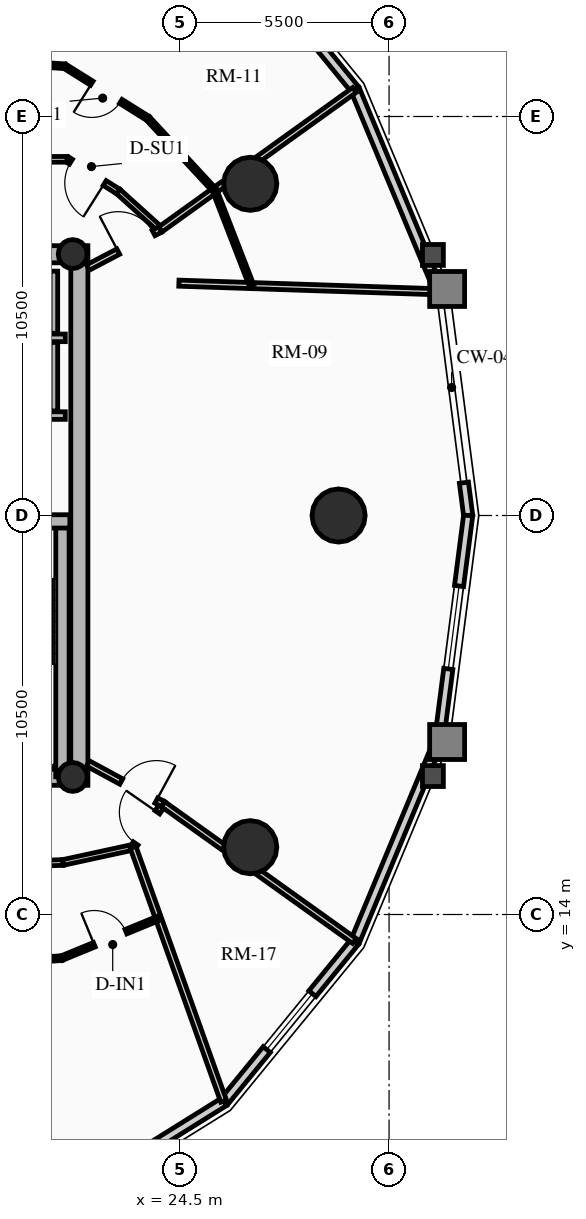
"""IFC4 building model, lengths in metres.
Left out: names, types, materials, properties, quantities, classifications, styles, units other than length and angle.
Written with IfcOpenShell. Run it as: python <this file> out.ifc"""

import sys

from ifc_helpers import new_model, si_unit, direction, frame, frame_2d, origin, origin_2d, place, context, subcontext, project, spatial, rectangle, circle, hollow_circle, extrude, source, transform, mapped, element, fill, save


model = new_model("IFC4")
c1 = context("Model", 3, precision=1e-05, world=origin(), true_north=direction((0.0, 1.0)))
c2 = subcontext(c1, "Body", "Model", "MODEL_VIEW")
j1 = project(units=[si_unit("LENGTHUNIT", "METRE"), si_unit("PLANEANGLEUNIT", "RADIAN")], contexts=[c1])
p1 = place(None, origin())
s1 = spatial("IfcSite", under=j1, at=p1, CompositionType="ELEMENT")
p2 = place(p1, origin())
s2 = spatial("IfcBuilding", under=s1, at=p2, CompositionType="ELEMENT")
p3 = place(p2, frame((0.0, 0.0, 110.89)))
s3 = spatial("IfcBuildingStorey", under=s2, at=p3, CompositionType="ELEMENT", Elevation=110.89)
p4 = place(p3, frame((21.85, 17.4, 0.0), z_axis=(0.0, 0.0, 1.0), x_axis=(0.0, 1.0, 0.0)))
e1 = element("IfcWall", 1, at=p4, inside=s3, PredefinedType="SHEAR", context=c2, shape_type="SweptSolid", body=[
    extrude(rectangle(XDim=14.2, YDim=0.45, at=frame_2d((7.1, 0.0))), origin(), (0.0, 0.0, 1.0), 2.91),
])
p5 = place(p3, frame((11.15, 17.625, 0.0), z_axis=(0.0, 0.0, 1.0), x_axis=(1.0, 0.0, 0.0)))
e2 = element("IfcWall", 2, at=p5, inside=s3, PredefinedType="SHEAR", context=c2, shape_type="SweptSolid", body=[
    extrude(rectangle(XDim=10.7, YDim=0.45, at=frame_2d((5.35, 0.0))), origin(), (0.0, 0.0, 1.0), 2.91),
])
m1 = source(origin(), c2, "Body", "SweptSolid", [
    extrude(rectangle(XDim=1.5, YDim=2.02, at=frame_2d((0.75, 1.01))), frame((0.0, 0.235, 0.0), z_axis=(0.0, -1.0, 0.0), x_axis=(1.0, 0.0, 0.0)), (0.0, 0.0, 1.0), 0.47),
])
p6 = place(p5, frame((5.45, 0.0, 0.0)))
e3 = element("IfcOpeningElement", 3, at=p6, cuts=e2, PredefinedType="OPENING", context=c2, shape_type="MappedRepresentation", body=[
    mapped(m1, transform((0.0, 0.0, 0.0), x_axis=(1.0, 0.0, 0.0), y_axis=(0.0, 1.0, 0.0), z_axis=(0.0, 0.0, 1.0), scale=1.0)),
])
p7 = place(p3, frame((11.15, 31.375, 0.0), z_axis=(0.0, 0.0, 1.0), x_axis=(1.0, 0.0, 0.0)))
e4 = element("IfcWall", 4, at=p7, inside=s3, PredefinedType="SHEAR", context=c2, shape_type="SweptSolid", body=[
    extrude(rectangle(XDim=10.7, YDim=0.45, at=frame_2d((5.35, 0.0))), origin(), (0.0, 0.0, 1.0), 2.91),
])
p8 = place(p7, frame((4.6, 0.0, 0.0)))
e5 = element("IfcOpeningElement", 5, at=p8, cuts=e4, PredefinedType="OPENING", context=c2, shape_type="MappedRepresentation", body=[
    mapped(m1, transform((0.0, 0.0, 0.0), x_axis=(1.0, 0.0, 0.0), y_axis=(0.0, 1.0, 0.0), z_axis=(0.0, 0.0, 1.0), scale=1.0)),
])
p9 = place(p3, frame((21.405, 17.625, 0.0), z_axis=(0.0, 0.0, 1.0), x_axis=(0.0, 1.0, 0.0)))
e6 = element("IfcWall", 6, at=p9, inside=s3, PredefinedType="SHEAR", context=c2, shape_type="SweptSolid", body=[
    extrude(rectangle(XDim=6.72, YDim=0.35, at=frame_2d((3.36, 0.0))), origin(), (0.0, 0.0, 1.0), 2.91),
])
p10 = place(p3, frame((18.315, 24.345, 0.0), z_axis=(0.0, 0.0, 1.0), x_axis=(1.0, 0.0, 0.0)))
e7 = element("IfcWall", 7, at=p10, inside=s3, PredefinedType="SHEAR", context=c2, shape_type="SweptSolid", body=[
    extrude(rectangle(XDim=3.285, YDim=0.35, at=frame_2d((1.643, 0.0))), origin(), (0.0, 0.0, 1.0), 2.91),
])
for number, where, z_axis, x_axis in (
    (8, (21.675, 17.62, 0.0), (0.0, 0.0, 1.0), (1.0, 0.0, 0.0)),
    (9, (21.675, 31.38, 0.0), (0.0, 0.0, 1.0), (1.0, 0.0, 0.0)),
):
    element("IfcColumn", number, at=place(p3, frame(where, z_axis=z_axis, x_axis=x_axis)), inside=s3, PredefinedType="COLUMN", context=c2, shape_type="SweptSolid", body=[
        extrude(hollow_circle(Radius=0.38, WallThickness=0.032, at=origin_2d()), origin(), (0.0, 0.0, 1.0), 2.91),
    ])
for number, where, z_axis, x_axis in (
    (10, (28.672, 24.5, 0.0), (0.0, 0.0, 1.0), (1.0, 0.0, 0.0)),
    (11, (26.347, 33.229, 0.0), (0.0, 0.0, 1.0), (1.0, 0.0, 0.0)),
    (12, (26.347, 15.771, 0.0), (0.0, 0.0, 1.0), (1.0, 0.0, 0.0)),
):
    element("IfcColumn", number, at=place(p3, frame(where, z_axis=z_axis, x_axis=x_axis)), inside=s3, PredefinedType="USERDEFINED", context=c2, shape_type="SweptSolid", body=[
        extrude(circle(Radius=0.7, at=origin_2d()), origin(), (0.0, 0.0, 1.0), 2.91),
    ])
p11 = place(p3, frame((31.969, 25.363, 0.0), z_axis=(0.0, 0.0, 1.0), x_axis=(0.128523364007, -0.991706481225, 0.0)))
e13 = element("IfcWall", 13, at=p11, inside=s3, PredefinedType="SOLIDWALL", context=c2, shape_type="SweptSolid", body=[
    extrude(rectangle(XDim=0.87, YDim=0.24, at=frame_2d((0.435, 0.0))), origin(), (0.0, 0.0, 1.0), 2.655),
])
p12 = place(p3, frame((29.105, 35.709, 0.0), z_axis=(0.0, 0.0, 1.0), x_axis=(0.384344417632, -0.923189779317, 0.0)))
e14 = element("IfcWall", 14, at=p12, inside=s3, PredefinedType="SOLIDWALL", context=c2, shape_type="SweptSolid", body=[
    extrude(rectangle(XDim=5.758, YDim=0.24, at=frame_2d((2.879, 0.0))), origin(), (0.0, 0.0, 1.0), 2.179),
])
p13 = place(p3, frame((25.658, 39.928, 0.0), z_axis=(0.0, 0.0, 1.0), x_axis=(0.632700781152, -0.77439635945, 0.0)))
e15 = element("IfcWall", 15, at=p13, inside=s3, PredefinedType="SOLIDWALL", context=c2, shape_type="SweptSolid", body=[
    extrude(rectangle(XDim=5.448, YDim=0.24, at=frame_2d((2.724, 0.0))), origin(), (0.0, 0.0, 1.0), 2.179),
])
m2 = source(origin(), c2, "Body", "SweptSolid", [
    extrude(rectangle(XDim=1.9, YDim=1.35, at=frame_2d((0.95, 0.675))), frame((0.0, 0.13, 0.0), z_axis=(0.0, -1.0, 0.0), x_axis=(1.0, 0.0, 0.0)), (0.0, 0.0, 1.0), 0.26),
])
p14 = place(p13, frame((1.774, 0.0, 0.65)))
e16 = element("IfcOpeningElement", 16, at=p14, cuts=e15, PredefinedType="OPENING", context=c2, shape_type="MappedRepresentation", body=[
    mapped(m2, transform((0.0, 0.0, 0.0), x_axis=(1.0, 0.0, 0.0), y_axis=(0.0, 1.0, 0.0), z_axis=(0.0, 0.0, 1.0), scale=1.0)),
])
p15 = place(p3, frame((25.658, 9.072, 0.0), z_axis=(0.0, 0.0, 1.0), x_axis=(-0.848520380187, -0.529162701263, 0.0)))
e17 = element("IfcWall", 17, at=p15, inside=s3, PredefinedType="SOLIDWALL", context=c2, shape_type="SweptSolid", body=[
    extrude(rectangle(XDim=5.119, YDim=0.24, at=frame_2d((2.56, 0.0))), origin(), (0.0, 0.0, 1.0), 2.179),
])
p16 = place(p3, frame((29.105, 13.291, 0.0), z_axis=(0.0, 0.0, 1.0), x_axis=(-0.632700781152, -0.77439635945, 0.0)))
e18 = element("IfcWall", 18, at=p16, inside=s3, PredefinedType="SOLIDWALL", context=c2, shape_type="SweptSolid", body=[
    extrude(rectangle(XDim=5.448, YDim=0.24, at=frame_2d((2.724, 0.0))), origin(), (0.0, 0.0, 1.0), 2.179),
])
p17 = place(p16, frame((1.774, 0.0, 0.65)))
e19 = element("IfcOpeningElement", 19, at=p17, cuts=e18, PredefinedType="OPENING", context=c2, shape_type="MappedRepresentation", body=[
    mapped(m2, transform((0.0, 0.0, 0.0), x_axis=(1.0, 0.0, 0.0), y_axis=(0.0, 1.0, 0.0), z_axis=(0.0, 0.0, 1.0), scale=1.0)),
])
p18 = place(p3, frame((31.318, 18.607, 0.0), z_axis=(0.0, 0.0, 1.0), x_axis=(-0.384344417632, -0.923189779317, 0.0)))
e20 = element("IfcWall", 20, at=p18, inside=s3, PredefinedType="SOLIDWALL", context=c2, shape_type="SweptSolid", body=[
    extrude(rectangle(XDim=5.758, YDim=0.24, at=frame_2d((2.879, 0.0))), origin(), (0.0, 0.0, 1.0), 2.179),
])
p19 = place(p3, frame((32.081, 24.5, 0.0), z_axis=(0.0, 0.0, 1.0), x_axis=(-0.128351991996, -0.991728675672, 0.0)))
e21 = element("IfcWall", 21, at=p19, inside=s3, PredefinedType="SOLIDWALL", context=c2, shape_type="SweptSolid", body=[
    extrude(rectangle(XDim=5.942, YDim=0.24, at=frame_2d((2.971, 0.0))), origin(), (0.0, 0.0, 1.0), 2.179),
])
m3 = source(origin(), c2, "Body", "SweptSolid", [
    extrude(rectangle(XDim=2.2, YDim=1.35, at=frame_2d((1.1, 0.675))), frame((0.0, 0.13, 0.0), z_axis=(0.0, -1.0, 0.0), x_axis=(1.0, 0.0, 0.0)), (0.0, 0.0, 1.0), 0.26),
])
p20 = place(p19, frame((1.871, 0.0, 0.65)))
e22 = element("IfcOpeningElement", 22, at=p20, cuts=e21, PredefinedType="OPENING", context=c2, shape_type="MappedRepresentation", body=[
    mapped(m3, transform((0.0, 0.0, 0.0), x_axis=(1.0, 0.0, 0.0), y_axis=(0.0, 1.0, 0.0), z_axis=(0.0, 0.0, 1.0), scale=1.0)),
])
for number, where, z_axis, x_axis in (
    (23, (18.51, 27.13, 0.0), (0.0, 0.0, 1.0), (1.0, 0.0, 0.0)),
    (24, (18.51, 29.175, 0.0), (0.0, 0.0, 1.0), (1.0, 0.0, 0.0)),
):
    element("IfcWall", number, at=place(p3, frame(where, z_axis=z_axis, x_axis=x_axis)), inside=s3, PredefinedType="SHEAR", context=c2, shape_type="SweptSolid", body=[
        extrude(rectangle(XDim=2.97, YDim=0.2, at=frame_2d((1.485, 0.0))), origin(), (0.0, 0.0, 1.0), 2.91),
    ])
p21 = place(p3, frame((21.18, 27.25, 0.0), z_axis=(0.0, 0.0, 1.0), x_axis=(0.0, 1.0, 0.0)))
e25 = element("IfcWall", 25, at=p21, inside=s3, PredefinedType="SHEAR", context=c2, shape_type="SweptSolid", body=[
    extrude(rectangle(XDim=1.805, YDim=0.2, at=frame_2d((0.902, 0.0))), origin(), (0.0, 0.0, 1.0), 2.91),
])
p22 = place(p3, frame((21.18, 29.295, 0.0), z_axis=(0.0, 0.0, 1.0), x_axis=(0.0, 1.0, 0.0)))
e26 = element("IfcWall", 26, at=p22, inside=s3, PredefinedType="SHEAR", context=c2, shape_type="SweptSolid", body=[
    extrude(rectangle(XDim=1.635, YDim=0.2, at=frame_2d((0.817, 0.0))), origin(), (0.0, 0.0, 1.0), 2.91),
])
p23 = place(p3, frame((23.98, 32.027, 0.0), z_axis=(0.0, 0.0, 1.0), x_axis=(-0.742353224332, 0.670008724065, 0.0)))
e27 = element("IfcWall", 27, at=p23, inside=s3, PredefinedType="PARTITIONING", context=c2, shape_type="SweptSolid", body=[
    extrude(rectangle(XDim=1.485, YDim=0.15, at=frame_2d((0.742, 0.0))), origin(), (0.0, 0.0, 1.0), 2.225),
])
p24 = place(p3, frame((22.877, 33.022, 0.0), z_axis=(0.0, 0.0, 1.0), x_axis=(-0.845895608855, 0.533348496689, 0.0)))
e28 = element("IfcWall", 28, at=p24, inside=s3, PredefinedType="PARTITIONING", context=c2, shape_type="SweptSolid", body=[
    extrude(rectangle(XDim=1.597, YDim=0.15, at=frame_2d((0.798, 0.0))), origin(), (0.0, 0.0, 1.0), 2.225),
])
m4 = source(origin(), c2, "Body", "SweptSolid", [
    extrude(rectangle(XDim=1.05, YDim=2.015, at=frame_2d((0.525, 1.007))), frame((0.0, 0.085, 0.0), z_axis=(0.0, -1.0, 0.0), x_axis=(1.0, 0.0, 0.0)), (0.0, 0.0, 1.0), 0.17),
])
p25 = place(p24, frame((0.427, 0.0, 0.0)))
e29 = element("IfcOpeningElement", 29, at=p25, cuts=e28, PredefinedType="OPENING", context=c2, shape_type="MappedRepresentation", body=[
    mapped(m4, transform((0.0, 0.0, 0.0), x_axis=(1.0, 0.0, 0.0), y_axis=(0.0, 1.0, 0.0), z_axis=(0.0, 0.0, 1.0), scale=1.0)),
])
p26 = place(p3, frame((21.527, 33.873, 0.0), z_axis=(0.0, 0.0, 1.0), x_axis=(-0.999991838845, -0.004040079574, 0.0)))
e30 = element("IfcWall", 30, at=p26, inside=s3, PredefinedType="PARTITIONING", context=c2, shape_type="SweptSolid", body=[
    extrude(rectangle(XDim=3.384, YDim=0.15, at=frame_2d((1.692, 0.0))), origin(), (0.0, 0.0, 1.0), 2.225),
])
p27 = place(p3, frame((14.781, 15.141, 0.0), z_axis=(0.0, 0.0, 1.0), x_axis=(0.999407918707, 0.034406569513, 0.0)))
e31 = element("IfcWall", 31, at=p27, inside=s3, PredefinedType="PARTITIONING", context=c2, shape_type="SweptSolid", body=[
    extrude(rectangle(XDim=6.642, YDim=0.15, at=frame_2d((3.321, 0.0))), origin(), (0.0, 0.0, 1.0), 2.225),
])
p28 = place(p27, frame((2.796, 0.0, 0.0)))
e32 = element("IfcOpeningElement", 32, at=p28, cuts=e31, PredefinedType="OPENING", context=c2, shape_type="MappedRepresentation", body=[
    mapped(m4, transform((0.0, 0.0, 0.0), x_axis=(1.0, 0.0, 0.0), y_axis=(0.0, 1.0, 0.0), z_axis=(0.0, 0.0, 1.0), scale=1.0)),
])
p29 = place(p3, frame((21.419, 15.369, 0.0), z_axis=(0.0, 0.0, 1.0), x_axis=(0.977192701953, 0.212354475464, 0.0)))
e33 = element("IfcWall", 33, at=p29, inside=s3, PredefinedType="PARTITIONING", context=c2, shape_type="SweptSolid", body=[
    extrude(rectangle(XDim=1.888, YDim=0.15, at=frame_2d((0.944, 0.0))), origin(), (0.0, 0.0, 1.0), 2.225),
])
p30 = place(p3, frame((23.263, 15.77, 0.0), z_axis=(0.0, 0.0, 1.0), x_axis=(0.570743456919, 0.821128434768, 0.0)))
e34 = element("IfcWall", 34, at=p30, inside=s3, PredefinedType="PARTITIONING", context=c2, shape_type="SweptSolid", body=[
    extrude(rectangle(XDim=1.382, YDim=0.15, at=frame_2d((0.691, 0.0))), origin(), (0.0, 0.0, 1.0), 2.225),
])
m5 = source(origin(), c2, "Body", "SweptSolid", [
    extrude(rectangle(XDim=1.0, YDim=2.015, at=frame_2d((0.5, 1.007))), frame((0.0, 0.085, 0.0), z_axis=(0.0, -1.0, 0.0), x_axis=(1.0, 0.0, 0.0)), (0.0, 0.0, 1.0), 0.17),
])
p31 = place(p30, frame((0.12, 0.0, 0.0)))
e35 = element("IfcOpeningElement", 35, at=p31, cuts=e34, PredefinedType="OPENING", context=c2, shape_type="MappedRepresentation", body=[
    mapped(m5, transform((0.0, 0.0, 0.0), x_axis=(1.0, 0.0, 0.0), y_axis=(0.0, 1.0, 0.0), z_axis=(0.0, 0.0, 1.0), scale=1.0)),
])
p32 = place(p3, frame((24.469, 30.614, 0.0), z_axis=(0.0, 0.0, 1.0), x_axis=(0.999446768925, -0.033258924898, 0.0)))
e36 = element("IfcWall", 36, at=p32, inside=s3, PredefinedType="PARTITIONING", context=c2, shape_type="SweptSolid", body=[
    extrude(rectangle(XDim=6.834, YDim=0.16, at=frame_2d((3.417, 0.0))), origin(), (0.0, 0.0, 1.0), 2.179),
])
p33 = place(p3, frame((23.98, 32.027, 0.0), z_axis=(0.0, 0.0, 1.0), x_axis=(0.812162479031, 0.58343132214, 0.0)))
e37 = element("IfcWall", 37, at=p33, inside=s3, PredefinedType="PARTITIONING", context=c2, shape_type="SweptSolid", body=[
    extrude(rectangle(XDim=6.291, YDim=0.16, at=frame_2d((3.146, 0.0))), origin(), (0.0, 0.0, 1.0), 2.179),
])
p34 = place(p3, frame((23.263, 15.77, 0.0), z_axis=(0.0, 0.0, 1.0), x_axis=(0.335919964206, -0.941890533793, 0.0)))
e38 = element("IfcWall", 38, at=p34, inside=s3, PredefinedType="PARTITIONING", context=c2, shape_type="SweptSolid", body=[
    extrude(rectangle(XDim=7.094, YDim=0.16, at=frame_2d((3.547, 0.0))), origin(), (0.0, 0.0, 1.0), 2.179),
])
p35 = place(p3, frame((24.052, 16.905, 0.0), z_axis=(0.0, 0.0, 1.0), x_axis=(0.813437670746, -0.581652091727, 0.0)))
e39 = element("IfcWall", 39, at=p35, inside=s3, PredefinedType="PARTITIONING", context=c2, shape_type="SweptSolid", body=[
    extrude(rectangle(XDim=6.192, YDim=0.16, at=frame_2d((3.096, 0.0))), origin(), (0.0, 0.0, 1.0), 2.179),
])
p36 = place(p3, frame((22.075, 31.025, 0.0), z_axis=(0.0, 0.0, 1.0), x_axis=(0.885026466958, 0.465540710125, 0.0)))
e40 = element("IfcWall", 40, at=p36, inside=s3, PredefinedType="PARTITIONING", context=c2, shape_type="SweptSolid", body=[
    extrude(rectangle(XDim=2.152, YDim=0.16, at=frame_2d((1.076, 0.0))), origin(), (0.0, 0.0, 1.0), 2.225),
])
m6 = source(origin(), c2, "Body", "SweptSolid", [
    extrude(rectangle(XDim=1.05, YDim=2.015, at=frame_2d((0.525, 1.007))), frame((0.0, 0.09, 0.0), z_axis=(0.0, -1.0, 0.0), x_axis=(1.0, 0.0, 0.0)), (0.0, 0.0, 1.0), 0.18),
])
p37 = place(p36, frame((0.902, 0.0, 0.0)))
e41 = element("IfcOpeningElement", 41, at=p37, cuts=e40, PredefinedType="OPENING", context=c2, shape_type="MappedRepresentation", body=[
    mapped(m6, transform((0.0, 0.0, 0.0), x_axis=(1.0, 0.0, 0.0), y_axis=(0.0, 1.0, 0.0), z_axis=(0.0, 0.0, 1.0), scale=1.0)),
])
p38 = place(p3, frame((22.075, 17.975, 0.0), z_axis=(0.0, 0.0, 1.0), x_axis=(0.879356383302, -0.476164206073, 0.0)))
e42 = element("IfcWall", 42, at=p38, inside=s3, PredefinedType="PARTITIONING", context=c2, shape_type="SweptSolid", body=[
    extrude(rectangle(XDim=2.248, YDim=0.16, at=frame_2d((1.124, 0.0))), origin(), (0.0, 0.0, 1.0), 2.225),
])
p39 = place(p38, frame((0.998, 0.0, 0.0)))
e43 = element("IfcOpeningElement", 43, at=p39, cuts=e42, PredefinedType="OPENING", context=c2, shape_type="MappedRepresentation", body=[
    mapped(m6, transform((0.0, 0.0, 0.0), x_axis=(1.0, 0.0, 0.0), y_axis=(0.0, 1.0, 0.0), z_axis=(0.0, 0.0, 1.0), scale=1.0)),
])
p40 = place(p3, frame((26.382, 30.551, 0.0), z_axis=(0.0, 0.0, 1.0), x_axis=(-0.361621391028, 0.932325034283, 0.0)))
e44 = element("IfcWall", 44, at=p40, inside=s3, PredefinedType="PARTITIONING", context=c2, shape_type="SweptSolid", body=[
    extrude(rectangle(XDim=2.686, YDim=0.125, at=frame_2d((1.343, 0.0))), origin(), (0.0, 0.0, 1.0), 2.225),
])
p41 = place(p3, frame((25.41, 33.054, 0.0), z_axis=(0.0, 0.0, 1.0), x_axis=(-0.679733694606, 0.73345899982, 0.0)))
e45 = element("IfcWall", 45, at=p41, inside=s3, PredefinedType="PARTITIONING", context=c2, shape_type="SweptSolid", body=[
    extrude(rectangle(XDim=2.586, YDim=0.125, at=frame_2d((1.293, 0.0))), origin(), (0.0, 0.0, 1.0), 2.655),
])
p42 = place(p3, frame((23.653, 34.951, 0.0), z_axis=(0.0, 0.0, 1.0), x_axis=(-0.847306782665, 0.531103771452, 0.0)))
e46 = element("IfcWall", 46, at=p42, inside=s3, PredefinedType="PARTITIONING", context=c2, shape_type="SweptSolid", body=[
    extrude(rectangle(XDim=2.581, YDim=0.125, at=frame_2d((1.291, 0.0))), origin(), (0.0, 0.0, 1.0), 2.225),
])
m7 = source(origin(), c2, "Body", "SweptSolid", [
    extrude(rectangle(XDim=0.9, YDim=2.005, at=frame_2d((0.45, 1.002))), frame((0.0, 0.073, 0.0), z_axis=(0.0, -1.0, 0.0), x_axis=(1.0, 0.0, 0.0)), (0.0, 0.0, 1.0), 0.145),
])
p43 = place(p42, frame((0.841, 0.0, 0.0)))
e47 = element("IfcOpeningElement", 47, at=p43, cuts=e46, PredefinedType="OPENING", context=c2, shape_type="MappedRepresentation", body=[
    mapped(m7, transform((0.0, 0.0, 0.0), x_axis=(1.0, 0.0, 0.0), y_axis=(0.0, 1.0, 0.0), z_axis=(0.0, 0.0, 1.0), scale=1.0)),
])
p44 = place(p3, frame((21.466, 36.322, 0.0), z_axis=(0.0, 0.0, 1.0), x_axis=(-0.997806476515, 0.066198454847, 0.0)))
e48 = element("IfcWall", 48, at=p44, inside=s3, PredefinedType="PARTITIONING", context=c2, shape_type="SweptSolid", body=[
    extrude(rectangle(XDim=3.791, YDim=0.125, at=frame_2d((1.896, 0.0))), origin(), (0.0, 0.0, 1.0), 2.225),
])
p45 = place(p3, frame((15.262, 12.427, 0.0), z_axis=(0.0, 0.0, 1.0), x_axis=(0.997595855995, 0.069300130605, 0.0)))
e49 = element("IfcWall", 49, at=p45, inside=s3, PredefinedType="PARTITIONING", context=c2, shape_type="SweptSolid", body=[
    extrude(rectangle(XDim=6.14, YDim=0.125, at=frame_2d((3.07, 0.0))), origin(), (0.0, 0.0, 1.0), 2.225),
])
p46 = place(p3, frame((21.388, 12.853, 0.0), z_axis=(0.0, 0.0, 1.0), x_axis=(0.924757149715, 0.380557767036, 0.0)))
e50 = element("IfcWall", 50, at=p46, inside=s3, PredefinedType="PARTITIONING", context=c2, shape_type="SweptSolid", body=[
    extrude(rectangle(XDim=2.75, YDim=0.125, at=frame_2d((1.375, 0.0))), origin(), (0.0, 0.0, 1.0), 2.179),
])
p47 = place(p46, frame((0.925, 0.0, 0.0)))
e51 = element("IfcOpeningElement", 51, at=p47, cuts=e50, PredefinedType="OPENING", context=c2, shape_type="MappedRepresentation", body=[
    mapped(m7, transform((0.0, 0.0, 0.0), x_axis=(1.0, 0.0, 0.0), y_axis=(0.0, 1.0, 0.0), z_axis=(0.0, 0.0, 1.0), scale=1.0)),
])
m8 = source(origin(), c2, "Body", "SweptSolid", [
    extrude(rectangle(XDim=1.9, YDim=1.35, at=frame_2d((0.95, 0.675))), frame((0.0, 0.03, 0.0), z_axis=(0.0, -1.0, 0.0), x_axis=(1.0, 0.0, 0.0)), (0.0, 0.0, 1.0), 0.06),
])
p48 = place(p17, origin())
e52 = element("IfcWindow", 52, at=p48, inside=s3, PartitioningType="DOUBLE_PANEL_VERTICAL", PredefinedType="WINDOW", context=c2, shape_type="MappedRepresentation", body=[
    mapped(m8, transform((0.0, 0.0, 0.0), x_axis=(1.0, 0.0, 0.0), y_axis=(0.0, 1.0, 0.0), z_axis=(0.0, 0.0, 1.0), scale=1.0)),
])
fill(e19, e52)
m9 = source(origin(), c2, "Body", "SweptSolid", [
    extrude(rectangle(XDim=2.2, YDim=1.35, at=frame_2d((1.1, 0.675))), frame((0.0, 0.03, 0.0), z_axis=(0.0, -1.0, 0.0), x_axis=(1.0, 0.0, 0.0)), (0.0, 0.0, 1.0), 0.06),
])
p49 = place(p20, origin())
e53 = element("IfcWindow", 53, at=p49, inside=s3, PartitioningType="DOUBLE_PANEL_VERTICAL", PredefinedType="WINDOW", context=c2, shape_type="MappedRepresentation", body=[
    mapped(m9, transform((0.0, 0.0, 0.0), x_axis=(1.0, 0.0, 0.0), y_axis=(0.0, 1.0, 0.0), z_axis=(0.0, 0.0, 1.0), scale=1.0)),
])
fill(e22, e53)
m10 = source(origin(), c2, "Body", "SweptSolid", [
    extrude(rectangle(XDim=1.05, YDim=2.015, at=frame_2d((0.525, 1.007))), frame((0.0, 0.025, 0.0), z_axis=(0.0, -1.0, 0.0), x_axis=(1.0, 0.0, 0.0)), (0.0, 0.0, 1.0), 0.05),
])
p50 = place(p37, origin())
e54 = element("IfcDoor", 54, at=p50, inside=s3, OperationType="SINGLE_SWING_LEFT", PredefinedType="DOOR", context=c2, shape_type="MappedRepresentation", body=[
    mapped(m10, transform((0.0, 0.0, 0.0), x_axis=(1.0, 0.0, 0.0), y_axis=(0.0, 1.0, 0.0), z_axis=(0.0, 0.0, 1.0), scale=1.0)),
])
fill(e41, e54)
p51 = place(p39, origin())
e55 = element("IfcDoor", 55, at=p51, inside=s3, OperationType="SINGLE_SWING_RIGHT", PredefinedType="DOOR", context=c2, shape_type="MappedRepresentation", body=[
    mapped(m10, transform((0.0, 0.0, 0.0), x_axis=(1.0, 0.0, 0.0), y_axis=(0.0, 1.0, 0.0), z_axis=(0.0, 0.0, 1.0), scale=1.0)),
])
fill(e43, e55)
p52 = place(p25, origin())
e56 = element("IfcDoor", 56, at=p52, inside=s3, OperationType="SINGLE_SWING_LEFT", PredefinedType="DOOR", context=c2, shape_type="MappedRepresentation", body=[
    mapped(m10, transform((0.0, 0.0, 0.0), x_axis=(1.0, 0.0, 0.0), y_axis=(0.0, 1.0, 0.0), z_axis=(0.0, 0.0, 1.0), scale=1.0)),
])
fill(e29, e56)
m11 = source(origin(), c2, "Body", "SweptSolid", [
    extrude(rectangle(XDim=0.9, YDim=2.005, at=frame_2d((0.45, 1.002))), frame((0.0, 0.025, 0.0), z_axis=(0.0, -1.0, 0.0), x_axis=(1.0, 0.0, 0.0)), (0.0, 0.0, 1.0), 0.05),
])
p53 = place(p43, origin())
e57 = element("IfcDoor", 57, at=p53, inside=s3, OperationType="SINGLE_SWING_RIGHT", PredefinedType="DOOR", context=c2, shape_type="MappedRepresentation", body=[
    mapped(m11, transform((0.0, 0.0, 0.0), x_axis=(1.0, 0.0, 0.0), y_axis=(0.0, 1.0, 0.0), z_axis=(0.0, 0.0, 1.0), scale=1.0)),
])
fill(e47, e57)
p54 = place(p47, origin())
e58 = element("IfcDoor", 58, at=p54, inside=s3, OperationType="SINGLE_SWING_LEFT", PredefinedType="DOOR", context=c2, shape_type="MappedRepresentation", body=[
    mapped(m11, transform((0.0, 0.0, 0.0), x_axis=(1.0, 0.0, 0.0), y_axis=(0.0, 1.0, 0.0), z_axis=(0.0, 0.0, 1.0), scale=1.0)),
])
fill(e51, e58)
m12 = source(origin(), c2, "Body", "SweptSolid", [
    extrude(rectangle(XDim=1.0, YDim=2.015, at=frame_2d((0.5, 1.007))), frame((0.0, 0.025, 0.0), z_axis=(0.0, -1.0, 0.0), x_axis=(1.0, 0.0, 0.0)), (0.0, 0.0, 1.0), 0.05),
])
p55 = place(p31, origin())
e59 = element("IfcDoor", 59, at=p55, inside=s3, OperationType="SINGLE_SWING_RIGHT", PredefinedType="DOOR", context=c2, shape_type="MappedRepresentation", body=[
    mapped(m12, transform((0.0, 0.0, 0.0), x_axis=(1.0, 0.0, 0.0), y_axis=(0.0, 1.0, 0.0), z_axis=(0.0, 0.0, 1.0), scale=1.0)),
])
fill(e35, e59)
save(model, sys.argv[1])
